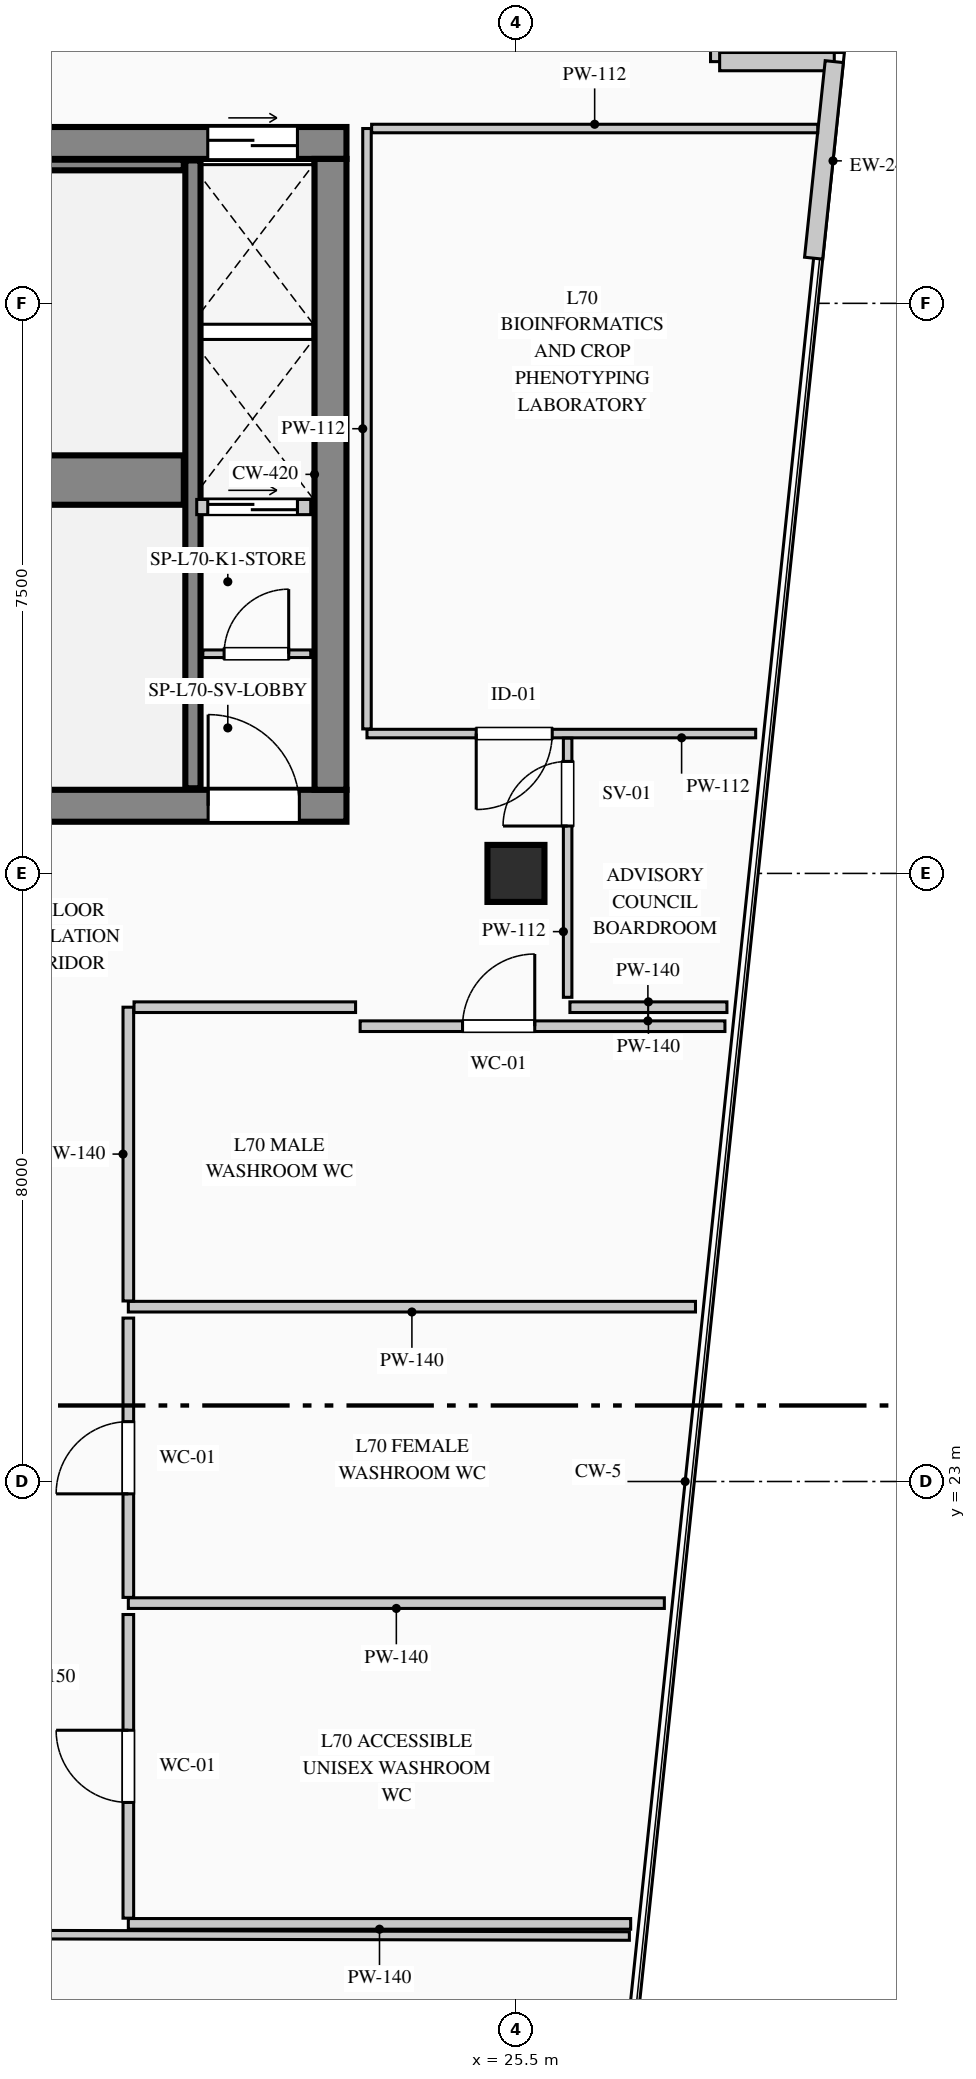
"""IFC4 building model, lengths in metres.
Left out: names, types, materials, properties, quantities, classifications, styles, units other than length and angle.
Written with IfcOpenShell. Run it as: python <this file> out.ifc"""

import sys

from ifc_helpers import new_model, si_unit, direction, frame, frame_2d, origin, origin_2d, place, context, subcontext, project, spatial, rectangle, extrude, element, fill, save


model = new_model("IFC4")
c1 = context("Model", 3, precision=1e-05, world=origin(), true_north=direction((0.0, 1.0)))
c2 = subcontext(c1, "Body", "Model", "MODEL_VIEW")
j1 = project(units=[si_unit("LENGTHUNIT", "METRE"), si_unit("PLANEANGLEUNIT", "RADIAN")], contexts=[c1])
p1 = place(None, origin())
s1 = spatial("IfcSite", under=j1, at=p1, CompositionType="ELEMENT")
p2 = place(p1, origin())
s2 = spatial("IfcBuilding", under=s1, at=p2, CompositionType="ELEMENT")
p3 = place(p2, frame((0.0, 0.0, 292.25)))
s3 = spatial("IfcBuildingStorey", under=s2, at=p3, CompositionType="ELEMENT", Elevation=292.25)
p4 = place(p3, frame((5.58, 40.61, 0.0), z_axis=(0.0, 0.0, 1.0), x_axis=(1.0, 0.0, 0.0)))
e1 = element("IfcWall", 1, at=p4, inside=s3, PredefinedType="SHEAR", context=c2, shape_type="SweptSolid", body=[
    extrude(rectangle(XDim=17.69, YDim=0.42, at=frame_2d((8.845, 0.0))), origin(), (0.0, 0.0, 1.0), 3.95),
])
p5 = place(p4, frame((15.865, 0.0, 0.0)))
e2 = element("IfcOpeningElement", 2, at=p5, cuts=e1, PredefinedType="OPENING", context=c2, shape_type="SweptSolid", body=[
    extrude(rectangle(XDim=1.18, YDim=2.25, at=frame_2d((0.59, 1.125))), frame((0.0, 0.22, 0.0), z_axis=(0.0, -1.0, 0.0), x_axis=(1.0, 0.0, 0.0)), (0.0, 0.0, 1.0), 0.44),
])
p6 = place(p3, frame((5.58, 31.89, 0.0), z_axis=(0.0, 0.0, 1.0), x_axis=(1.0, 0.0, 0.0)))
e3 = element("IfcWall", 3, at=p6, inside=s3, PredefinedType="SHEAR", context=c2, shape_type="SweptSolid", body=[
    extrude(rectangle(XDim=17.69, YDim=0.42, at=frame_2d((8.845, 0.0))), origin(), (0.0, 0.0, 1.0), 3.95),
])
p7 = place(p6, frame((3.07, 0.0, 0.0)))
e4 = element("IfcOpeningElement", 4, at=p7, cuts=e3, PredefinedType="OPENING", context=c2, shape_type="SweptSolid", body=[
    extrude(rectangle(XDim=1.2, YDim=2.2, at=frame_2d((0.6, 1.1))), frame((0.0, 0.22, 0.0), z_axis=(0.0, -1.0, 0.0), x_axis=(1.0, 0.0, 0.0)), (0.0, 0.0, 1.0), 0.44),
])
p8 = place(p6, frame((6.92, 0.0, 0.0)))
e5 = element("IfcOpeningElement", 5, at=p8, cuts=e3, PredefinedType="OPENING", context=c2, shape_type="SweptSolid", body=[
    extrude(rectangle(XDim=1.2, YDim=2.2, at=frame_2d((0.6, 1.1))), frame((0.0, 0.22, 0.0), z_axis=(0.0, -1.0, 0.0), x_axis=(1.0, 0.0, 0.0)), (0.0, 0.0, 1.0), 0.44),
])
p9 = place(p6, frame((8.77, 0.0, 0.0)))
e6 = element("IfcOpeningElement", 6, at=p9, cuts=e3, PredefinedType="OPENING", context=c2, shape_type="SweptSolid", body=[
    extrude(rectangle(XDim=1.15, YDim=2.2, at=frame_2d((0.575, 1.1))), frame((0.0, 0.22, 0.0), z_axis=(0.0, -1.0, 0.0), x_axis=(1.0, 0.0, 0.0)), (0.0, 0.0, 1.0), 0.44),
])
p10 = place(p6, frame((15.87, 0.0, 0.0)))
e7 = element("IfcOpeningElement", 7, at=p10, cuts=e3, PredefinedType="OPENING", context=c2, shape_type="SweptSolid", body=[
    extrude(rectangle(XDim=1.2, YDim=2.2, at=frame_2d((0.6, 1.1))), frame((0.0, 0.22, 0.0), z_axis=(0.0, -1.0, 0.0), x_axis=(1.0, 0.0, 0.0)), (0.0, 0.0, 1.0), 0.44),
])
p11 = place(p3, frame((23.06, 32.1, 0.0), z_axis=(0.0, 0.0, 1.0), x_axis=(0.0, 1.0, 0.0)))
e8 = element("IfcWall", 8, at=p11, inside=s3, PredefinedType="SHEAR", context=c2, shape_type="SweptSolid", body=[
    extrude(rectangle(XDim=8.3, YDim=0.42, at=frame_2d((4.15, 0.0))), origin(), (0.0, 0.0, 1.0), 3.95),
])
p12 = place(p3, frame((14.12, 36.175, 0.0), z_axis=(0.0, 0.0, 1.0), x_axis=(1.0, 0.0, 0.0)))
e9 = element("IfcWall", 9, at=p12, inside=s3, PredefinedType="SHEAR", context=c2, shape_type="SweptSolid", body=[
    extrude(rectangle(XDim=7.01, YDim=0.65, at=frame_2d((3.505, 0.0))), origin(), (0.0, 0.0, 1.0), 3.95),
])
p13 = place(p3, frame((21.25, 32.12, 0.0), z_axis=(0.0, 0.0, 1.0), x_axis=(0.0, 1.0, 0.0)))
e10 = element("IfcWall", 10, at=p13, inside=s3, PredefinedType="SHEAR", context=c2, shape_type="SweptSolid", body=[
    extrude(rectangle(XDim=8.26, YDim=0.2, at=frame_2d((4.13, 0.0))), origin(), (0.0, 0.0, 1.0), 3.95),
])
p14 = place(p3, frame((14.12, 40.32, 0.0), z_axis=(0.0, 0.0, 1.0), x_axis=(1.0, 0.0, 0.0)))
e11 = element("IfcWall", 11, at=p14, inside=s3, PredefinedType="SHEAR", context=c2, shape_type="SweptSolid", body=[
    extrude(rectangle(XDim=7.01, YDim=0.14, at=frame_2d((3.505, 0.0))), origin(), (0.0, 0.0, 1.0), 3.95),
])
p15 = place(p3, frame((25.5, 31.0, 0.0), z_axis=(0.0, 0.0, 1.0), x_axis=(1.0, 0.0, 0.0)))
e12 = element("IfcColumn", 12, at=p15, inside=s3, PredefinedType="COLUMN", context=c2, shape_type="SweptSolid", body=[
    extrude(rectangle(XDim=0.75, YDim=0.75, at=origin_2d()), origin(), (0.0, 0.0, 1.0), 3.95),
])
p16 = place(p3, frame((28.18, 43.38, 0.0), z_axis=(0.0, 0.0, 1.0), x_axis=(0.0, -1.0, 0.0)))
e13 = element("IfcWall", 13, at=p16, inside=s3, PredefinedType="STANDARD", context=c2, shape_type="SweptSolid", body=[
    extrude(rectangle(XDim=1.7, YDim=0.24, at=frame_2d((0.85, 0.0))), origin(), (0.0, 0.0, 1.0), 3.7),
])
p17 = place(p3, frame((28.18, 41.68, 0.0), z_axis=(0.0, 0.0, 1.0), x_axis=(1.0, 0.0, 0.0)))
e14 = element("IfcWall", 14, at=p17, inside=s3, PredefinedType="STANDARD", context=c2, shape_type="SweptSolid", body=[
    extrude(rectangle(XDim=1.508, YDim=0.24, at=frame_2d((0.754, 0.0))), origin(), (0.0, 0.0, 1.0), 3.7),
])
p18 = place(p3, frame((29.688, 41.68, 0.0), z_axis=(0.0, 0.0, 1.0), x_axis=(-0.104420821624, -0.994533203071, 0.0)))
e15 = element("IfcWall", 15, at=p18, inside=s3, PredefinedType="STANDARD", context=c2, shape_type="SweptSolid", body=[
    extrude(rectangle(XDim=2.6, YDim=0.24, at=frame_2d((1.3, 0.0))), origin(), (0.0, 0.0, 1.0), 3.7),
])
p19 = place(p3, frame((21.38, 33.89, 0.0), z_axis=(0.0, 0.0, 1.0), x_axis=(1.0, 0.0, 0.0)))
e16 = element("IfcWall", 16, at=p19, inside=s3, PredefinedType="PARTITIONING", context=c2, shape_type="SweptSolid", body=[
    extrude(rectangle(XDim=1.42, YDim=0.1, at=frame_2d((0.71, 0.0))), origin(), (0.0, 0.0, 1.0), 3.7),
])
p20 = place(p19, frame((0.28, 0.0, 0.0)))
e17 = element("IfcOpeningElement", 17, at=p20, cuts=e16, PredefinedType="OPENING", context=c2, shape_type="SweptSolid", body=[
    extrude(rectangle(XDim=0.85, YDim=2.1, at=frame_2d((0.425, 1.05))), frame((0.0, 0.06, 0.0), z_axis=(0.0, -1.0, 0.0), x_axis=(1.0, 0.0, 0.0)), (0.0, 0.0, 1.0), 0.12),
])
p21 = place(p3, frame((21.3, 35.82, 0.0), z_axis=(0.0, 0.0, 1.0), x_axis=(1.0, 0.0, 0.0)))
e18 = element("IfcWall", 18, at=p21, inside=s3, PredefinedType="PARTITIONING", context=c2, shape_type="SweptSolid", body=[
    extrude(rectangle(XDim=1.5, YDim=0.2, at=frame_2d((0.75, 0.0))), origin(), (0.0, 0.0, 1.0), 3.7),
])
p22 = place(p21, frame((0.145, 0.0, 0.0)))
e19 = element("IfcOpeningElement", 19, at=p22, cuts=e18, PredefinedType="OPENING", context=c2, shape_type="SweptSolid", body=[
    extrude(rectangle(XDim=1.18, YDim=2.25, at=frame_2d((0.59, 1.125))), frame((0.0, 0.11, 0.0), z_axis=(0.0, -1.0, 0.0), x_axis=(1.0, 0.0, 0.0)), (0.0, 0.0, 1.0), 0.22),
])
p23 = place(p3, frame((28.654, 32.84, 0.0), z_axis=(0.0, 0.0, 1.0), x_axis=(-1.0, 0.0, 0.0)))
e20 = element("IfcWall", 20, at=p23, inside=s3, PredefinedType="PARTITIONING", context=c2, shape_type="SweptSolid", body=[
    extrude(rectangle(XDim=5.114, YDim=0.112, at=frame_2d((2.557, 0.0))), origin(), (0.0, 0.0, 1.0), 3.7),
])
p24 = place(p23, frame((2.677, 0.0, 0.0)))
e21 = element("IfcOpeningElement", 21, at=p24, cuts=e20, PredefinedType="OPENING", context=c2, shape_type="SweptSolid", body=[
    extrude(rectangle(XDim=1.0, YDim=2.15, at=frame_2d((0.5, 1.075))), frame((0.0, 0.066, 0.0), z_axis=(0.0, -1.0, 0.0), x_axis=(1.0, 0.0, 0.0)), (0.0, 0.0, 1.0), 0.132),
])
p25 = place(p3, frame((23.54, 32.901, 0.0), z_axis=(0.0, 0.0, 1.0), x_axis=(0.0, 1.0, 0.0)))
e22 = element("IfcWall", 22, at=p25, inside=s3, PredefinedType="PARTITIONING", context=c2, shape_type="SweptSolid", body=[
    extrude(rectangle(XDim=7.899, YDim=0.112, at=frame_2d((3.95, 0.0))), origin(), (0.0, 0.0, 1.0), 3.7),
])
p26 = place(p3, frame((23.601, 40.8, 0.0), z_axis=(0.0, 0.0, 1.0), x_axis=(1.0, 0.0, 0.0)))
e23 = element("IfcWall", 23, at=p26, inside=s3, PredefinedType="PARTITIONING", context=c2, shape_type="SweptSolid", body=[
    extrude(rectangle(XDim=5.869, YDim=0.112, at=frame_2d((2.935, 0.0))), origin(), (0.0, 0.0, 1.0), 3.7),
])
p27 = place(p3, frame((23.45, 28.99, 0.0), z_axis=(0.0, 0.0, 1.0), x_axis=(1.0, 0.0, 0.0)))
e24 = element("IfcWall", 24, at=p27, inside=s3, PredefinedType="PARTITIONING", context=c2, shape_type="SweptSolid", body=[
    extrude(rectangle(XDim=4.8, YDim=0.14, at=frame_2d((2.4, 0.0))), origin(), (0.0, 0.0, 1.0), 3.7),
])
p28 = place(p27, frame((1.347, 0.0, 0.0)))
e25 = element("IfcOpeningElement", 25, at=p28, cuts=e24, PredefinedType="OPENING", context=c2, shape_type="SweptSolid", body=[
    extrude(rectangle(XDim=0.95, YDim=2.15, at=frame_2d((0.475, 1.075))), frame((0.0, 0.08, 0.0), z_axis=(0.0, -1.0, 0.0), x_axis=(1.0, 0.0, 0.0)), (0.0, 0.0, 1.0), 0.16),
])
p29 = place(p3, frame((26.21, 29.24, 0.0), z_axis=(0.0, 0.0, 1.0), x_axis=(1.0, 0.0, 0.0)))
e26 = element("IfcWall", 26, at=p29, inside=s3, PredefinedType="PARTITIONING", context=c2, shape_type="SweptSolid", body=[
    extrude(rectangle(XDim=2.066, YDim=0.14, at=frame_2d((1.033, 0.0))), origin(), (0.0, 0.0, 1.0), 3.7),
])
p30 = place(p3, frame((27.862, 25.3, 0.0), z_axis=(0.0, 0.0, 1.0), x_axis=(-1.0, 0.0, 0.0)))
e27 = element("IfcWall", 27, at=p30, inside=s3, PredefinedType="PARTITIONING", context=c2, shape_type="SweptSolid", body=[
    extrude(rectangle(XDim=7.462, YDim=0.14, at=frame_2d((3.731, 0.0))), origin(), (0.0, 0.0, 1.0), 3.7),
])
p31 = place(p3, frame((20.4, 25.375, 0.0), z_axis=(0.0, 0.0, 1.0), x_axis=(0.0, 1.0, 0.0)))
e28 = element("IfcWall", 28, at=p31, inside=s3, PredefinedType="PARTITIONING", context=c2, shape_type="SweptSolid", body=[
    extrude(rectangle(XDim=3.865, YDim=0.14, at=frame_2d((1.933, 0.0))), origin(), (0.0, 0.0, 1.0), 3.7),
])
p32 = place(p3, frame((20.475, 29.24, 0.0), z_axis=(0.0, 0.0, 1.0), x_axis=(1.0, 0.0, 0.0)))
e29 = element("IfcWall", 29, at=p32, inside=s3, PredefinedType="PARTITIONING", context=c2, shape_type="SweptSolid", body=[
    extrude(rectangle(XDim=2.915, YDim=0.14, at=frame_2d((1.458, 0.0))), origin(), (0.0, 0.0, 1.0), 3.7),
])
p33 = place(p3, frame((27.452, 21.4, 0.0), z_axis=(0.0, 0.0, 1.0), x_axis=(-1.0, 0.0, 0.0)))
e30 = element("IfcWall", 30, at=p33, inside=s3, PredefinedType="PARTITIONING", context=c2, shape_type="SweptSolid", body=[
    extrude(rectangle(XDim=7.052, YDim=0.14, at=frame_2d((3.526, 0.0))), origin(), (0.0, 0.0, 1.0), 3.7),
])
p34 = place(p3, frame((20.4, 21.475, 0.0), z_axis=(0.0, 0.0, 1.0), x_axis=(0.0, 1.0, 0.0)))
e31 = element("IfcWall", 31, at=p34, inside=s3, PredefinedType="PARTITIONING", context=c2, shape_type="SweptSolid", body=[
    extrude(rectangle(XDim=3.675, YDim=0.14, at=frame_2d((1.837, 0.0))), origin(), (0.0, 0.0, 1.0), 3.7),
])
p35 = place(p34, frame((1.363, 0.0, 0.0)))
e32 = element("IfcOpeningElement", 32, at=p35, cuts=e31, PredefinedType="OPENING", context=c2, shape_type="SweptSolid", body=[
    extrude(rectangle(XDim=0.95, YDim=2.15, at=frame_2d((0.475, 1.075))), frame((0.0, 0.08, 0.0), z_axis=(0.0, -1.0, 0.0), x_axis=(1.0, 0.0, 0.0)), (0.0, 0.0, 1.0), 0.16),
])
p36 = place(p3, frame((27.009, 17.18, 0.0), z_axis=(0.0, 0.0, 1.0), x_axis=(-1.0, 0.0, 0.0)))
e33 = element("IfcWall", 33, at=p36, inside=s3, PredefinedType="PARTITIONING", context=c2, shape_type="SweptSolid", body=[
    extrude(rectangle(XDim=6.609, YDim=0.14, at=frame_2d((3.305, 0.0))), origin(), (0.0, 0.0, 1.0), 3.7),
])
p37 = place(p3, frame((20.4, 17.255, 0.0), z_axis=(0.0, 0.0, 1.0), x_axis=(0.0, 1.0, 0.0)))
e34 = element("IfcWall", 34, at=p37, inside=s3, PredefinedType="PARTITIONING", context=c2, shape_type="SweptSolid", body=[
    extrude(rectangle(XDim=3.995, YDim=0.14, at=frame_2d((1.998, 0.0))), origin(), (0.0, 0.0, 1.0), 3.7),
])
p38 = place(p37, frame((1.522, 0.0, 0.0)))
e35 = element("IfcOpeningElement", 35, at=p38, cuts=e34, PredefinedType="OPENING", context=c2, shape_type="SweptSolid", body=[
    extrude(rectangle(XDim=0.95, YDim=2.15, at=frame_2d((0.475, 1.075))), frame((0.0, 0.08, 0.0), z_axis=(0.0, -1.0, 0.0), x_axis=(1.0, 0.0, 0.0)), (0.0, 0.0, 1.0), 0.16),
])
p39 = place(p3, frame((4.756, 17.071, 0.0), z_axis=(0.0, 0.0, 1.0), x_axis=(0.999997417422, -0.00227269645, 0.0)))
e36 = element("IfcWall", 36, at=p39, inside=s3, PredefinedType="PARTITIONING", context=c2, shape_type="SweptSolid", body=[
    extrude(rectangle(XDim=22.237, YDim=0.112, at=frame_2d((11.118, 0.0))), origin(), (0.0, 0.0, 1.0), 3.7),
])
p40 = place(p39, frame((10.618, 0.0, 0.0)))
e37 = element("IfcOpeningElement", 37, at=p40, cuts=e36, PredefinedType="OPENING", context=c2, shape_type="SweptSolid", body=[
    extrude(rectangle(XDim=1.0, YDim=2.15, at=frame_2d((0.5, 1.075))), frame((0.0, 0.066, 0.0), z_axis=(0.0, -1.0, 0.0), x_axis=(1.0, 0.0, 0.0)), (0.0, 0.0, 1.0), 0.132),
])
p41 = place(p3, frame((26.18, 29.37, 0.0), z_axis=(0.0, 0.0, 1.0), x_axis=(0.0, 1.0, 0.0)))
e38 = element("IfcWall", 38, at=p41, inside=s3, PredefinedType="PARTITIONING", context=c2, shape_type="SweptSolid", body=[
    extrude(rectangle(XDim=3.409, YDim=0.112, at=frame_2d((1.705, 0.0))), origin(), (0.0, 0.0, 1.0), 3.7),
])
p42 = place(p41, frame((2.253, 0.0, 0.0)))
e39 = element("IfcOpeningElement", 39, at=p42, cuts=e38, PredefinedType="OPENING", context=c2, shape_type="SweptSolid", body=[
    extrude(rectangle(XDim=0.85, YDim=2.1, at=frame_2d((0.425, 1.05))), frame((0.0, 0.066, 0.0), z_axis=(0.0, -1.0, 0.0), x_axis=(1.0, 0.0, 0.0)), (0.0, 0.0, 1.0), 0.132),
])
p43 = place(p10, origin())
e40 = element("IfcDoor", 40, at=p43, inside=s3, OperationType="SINGLE_SWING_LEFT", PredefinedType="DOOR", context=c2, shape_type="SweptSolid", body=[
    extrude(rectangle(XDim=1.2, YDim=2.2, at=frame_2d((0.6, 1.1))), frame((0.0, 0.025, 0.0), z_axis=(0.0, -1.0, 0.0), x_axis=(1.0, 0.0, 0.0)), (0.0, 0.0, 1.0), 0.05),
])
fill(e7, e40)
p44 = place(p20, origin())
e41 = element("IfcDoor", 41, at=p44, inside=s3, OperationType="SINGLE_SWING_RIGHT", PredefinedType="DOOR", context=c2, shape_type="SweptSolid", body=[
    extrude(rectangle(XDim=0.85, YDim=2.1, at=frame_2d((0.425, 1.05))), frame((0.0, 0.025, 0.0), z_axis=(0.0, -1.0, 0.0), x_axis=(1.0, 0.0, 0.0)), (0.0, 0.0, 1.0), 0.05),
])
fill(e17, e41)
p45 = place(p5, origin())
e42 = element("IfcDoor", 42, at=p45, inside=s3, OperationType="DOUBLE_DOOR_SLIDING", PredefinedType="DOOR", context=c2, shape_type="SweptSolid", body=[
    extrude(rectangle(XDim=1.18, YDim=2.25, at=frame_2d((0.59, 1.125))), frame((0.0, 0.025, 0.0), z_axis=(0.0, -1.0, 0.0), x_axis=(1.0, 0.0, 0.0)), (0.0, 0.0, 1.0), 0.05),
])
fill(e2, e42)
p46 = place(p22, origin())
e43 = element("IfcDoor", 43, at=p46, inside=s3, OperationType="DOUBLE_DOOR_SLIDING", PredefinedType="DOOR", context=c2, shape_type="SweptSolid", body=[
    extrude(rectangle(XDim=1.18, YDim=2.25, at=frame_2d((0.59, 1.125))), frame((0.0, 0.025, 0.0), z_axis=(0.0, -1.0, 0.0), x_axis=(1.0, 0.0, 0.0)), (0.0, 0.0, 1.0), 0.05),
])
fill(e19, e43)
p47 = place(p24, origin())
e44 = element("IfcDoor", 44, at=p47, inside=s3, OperationType="SINGLE_SWING_RIGHT", PredefinedType="DOOR", context=c2, shape_type="SweptSolid", body=[
    extrude(rectangle(XDim=1.0, YDim=2.15, at=frame_2d((0.5, 1.075))), frame((0.0, 0.025, 0.0), z_axis=(0.0, -1.0, 0.0), x_axis=(1.0, 0.0, 0.0)), (0.0, 0.0, 1.0), 0.05),
])
fill(e21, e44)
p48 = place(p28, origin())
e45 = element("IfcDoor", 45, at=p48, inside=s3, OperationType="SINGLE_SWING_RIGHT", PredefinedType="DOOR", context=c2, shape_type="SweptSolid", body=[
    extrude(rectangle(XDim=0.95, YDim=2.15, at=frame_2d((0.475, 1.075))), frame((0.0, 0.025, 0.0), z_axis=(0.0, -1.0, 0.0), x_axis=(1.0, 0.0, 0.0)), (0.0, 0.0, 1.0), 0.05),
])
fill(e25, e45)
p49 = place(p35, origin())
e46 = element("IfcDoor", 46, at=p49, inside=s3, OperationType="SINGLE_SWING_LEFT", PredefinedType="DOOR", context=c2, shape_type="SweptSolid", body=[
    extrude(rectangle(XDim=0.95, YDim=2.15, at=frame_2d((0.475, 1.075))), frame((0.0, 0.025, 0.0), z_axis=(0.0, -1.0, 0.0), x_axis=(1.0, 0.0, 0.0)), (0.0, 0.0, 1.0), 0.05),
])
fill(e32, e46)
p50 = place(p38, origin())
e47 = element("IfcDoor", 47, at=p50, inside=s3, OperationType="SINGLE_SWING_RIGHT", PredefinedType="DOOR", context=c2, shape_type="SweptSolid", body=[
    extrude(rectangle(XDim=0.95, YDim=2.15, at=frame_2d((0.475, 1.075))), frame((0.0, 0.025, 0.0), z_axis=(0.0, -1.0, 0.0), x_axis=(1.0, 0.0, 0.0)), (0.0, 0.0, 1.0), 0.05),
])
fill(e35, e47)
p51 = place(p42, origin())
e48 = element("IfcDoor", 48, at=p51, inside=s3, OperationType="SINGLE_SWING_LEFT", PredefinedType="DOOR", context=c2, shape_type="SweptSolid", body=[
    extrude(rectangle(XDim=0.85, YDim=2.1, at=frame_2d((0.425, 1.05))), frame((0.0, 0.025, 0.0), z_axis=(0.0, -1.0, 0.0), x_axis=(1.0, 0.0, 0.0)), (0.0, 0.0, 1.0), 0.05),
])
fill(e39, e48)
save(model, sys.argv[1])
